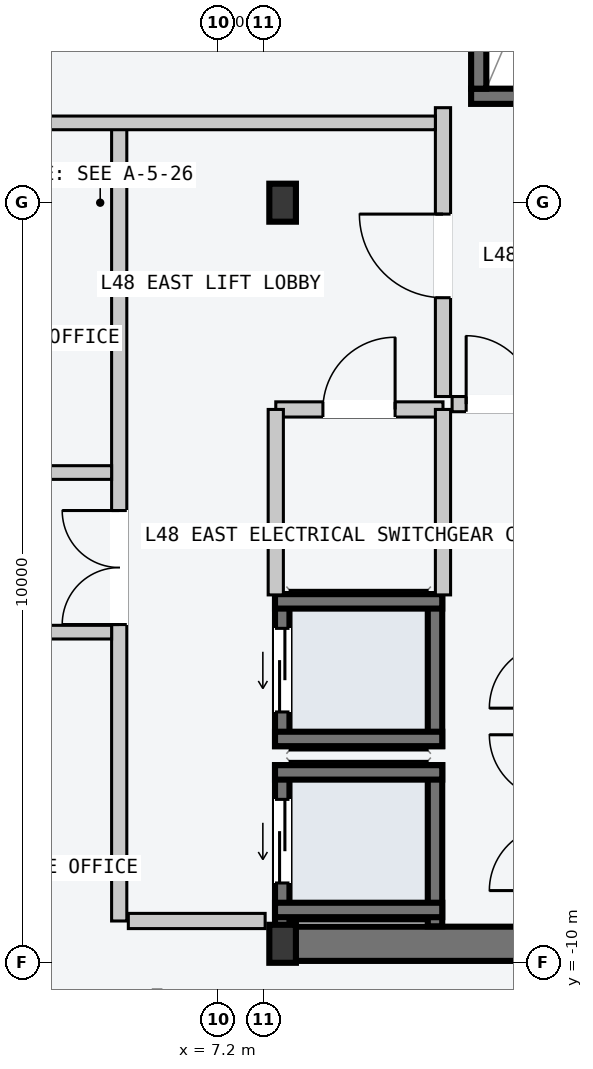
"""IFC4 building model, lengths in metres.
Left out: names, types, materials, properties, quantities, classifications, styles, units other than length and angle.
Written with IfcOpenShell. Run it as: python <this file> out.ifc"""

import sys

from ifc_helpers import new_model, si_unit, direction, frame, frame_2d, origin, origin_2d, place, context, subcontext, project, spatial, rectangle, i_section, extrude, element, fill, save


model = new_model("IFC4")
c1 = context("Model", 3, precision=1e-05, world=origin(), true_north=direction((0.0, 1.0)))
c2 = subcontext(c1, "Body", "Model", "MODEL_VIEW")
j1 = project(units=[si_unit("LENGTHUNIT", "METRE"), si_unit("PLANEANGLEUNIT", "RADIAN")], contexts=[c1])
p1 = place(None, origin())
s1 = spatial("IfcSite", under=j1, at=p1, CompositionType="ELEMENT")
p2 = place(p1, origin())
s2 = spatial("IfcBuilding", under=s1, at=p2, CompositionType="ELEMENT")
p3 = place(p2, frame((0.0, 0.0, 183.9)))
s3 = spatial("IfcBuildingStorey", under=s2, at=p3, CompositionType="ELEMENT", Elevation=183.9)
p4 = place(p3, frame((8.07, -9.75, -0.2), z_axis=(0.0, 0.0, 1.0), x_axis=(1.0, 0.0, 0.0)))
e1 = element("IfcWall", 1, at=p4, inside=s3, PredefinedType="SHEAR", context=c2, shape_type="SweptSolid", body=[
    extrude(rectangle(XDim=6.46, YDim=0.45, at=frame_2d((3.23, 0.0))), origin(), (0.0, 0.0, 1.0), 3.6),
])
p5 = place(p3, frame((10.53, 1.4, -0.2), z_axis=(0.0, 0.0, 1.0), x_axis=(1.0, 0.0, 0.0)))
e2 = element("IfcWall", 2, at=p5, inside=s3, PredefinedType="SOLIDWALL", context=c2, shape_type="SweptSolid", body=[
    extrude(rectangle(XDim=3.72, YDim=0.2, at=frame_2d((1.86, 0.0))), origin(), (0.0, 0.0, 1.0), 3.6),
])
p6 = place(p5, frame((1.5, 0.0, 0.2)))
e3 = element("IfcOpeningElement", 3, at=p6, cuts=e2, PredefinedType="OPENING", context=c2, shape_type="SweptSolid", body=[
    extrude(rectangle(XDim=1.12, YDim=2.18, at=frame_2d((0.56, 1.09))), frame((0.0, 0.11, 0.0), z_axis=(0.0, -1.0, 0.0), x_axis=(1.0, 0.0, 0.0)), (0.0, 0.0, 1.0), 0.22),
])
p7 = place(p3, frame((10.63, 1.5, -0.2), z_axis=(0.0, 0.0, 1.0), x_axis=(0.0, 1.0, 0.0)))
e4 = element("IfcWall", 4, at=p7, inside=s3, PredefinedType="SOLIDWALL", context=c2, shape_type="SweptSolid", body=[
    extrude(rectangle(XDim=7.8, YDim=0.2, at=frame_2d((3.9, 0.0))), origin(), (0.0, 0.0, 1.0), 3.6),
])
for number, where, z_axis, x_axis in (
    (5, (8.05, -9.75, 0.0), (0.0, 0.0, 1.0), (1.0, 0.0, 0.0)),
    (6, (8.05, 0.0, 0.0), (0.0, 0.0, 1.0), (1.0, 0.0, 0.0)),
):
    element("IfcColumn", number, at=place(p3, frame(where, z_axis=z_axis, x_axis=x_axis)), inside=s3, PredefinedType="COLUMN", context=c2, shape_type="SweptSolid", body=[
        extrude(i_section(OverallWidth=0.35, OverallDepth=0.5, WebThickness=0.02, FlangeThickness=0.032, at=origin_2d()), origin(), (0.0, 0.0, 1.0), 3.6),
    ])
p8 = place(p3, frame((8.045, -9.52, -0.2), z_axis=(0.0, 0.0, 1.0), x_axis=(0.0, 1.0, 0.0)))
e7 = element("IfcWall", 7, at=p8, inside=s3, PredefinedType="SOLIDWALL", context=c2, shape_type="SweptSolid", body=[
    extrude(rectangle(XDim=2.12, YDim=0.19, at=frame_2d((1.06, 0.0))), origin(), (0.0, 0.0, 1.0), 3.6),
])
p9 = place(p8, frame((0.57, 0.0, 0.2)))
e8 = element("IfcOpeningElement", 8, at=p9, cuts=e7, PredefinedType="OPENING", context=c2, shape_type="SweptSolid", body=[
    extrude(rectangle(XDim=1.1, YDim=2.2, at=frame_2d((0.55, 1.1))), frame((0.0, 0.105, 0.0), z_axis=(0.0, -1.0, 0.0), x_axis=(1.0, 0.0, 0.0)), (0.0, 0.0, 1.0), 0.21),
])
p10 = place(p3, frame((10.055, -9.52, -0.2), z_axis=(0.0, 0.0, 1.0), x_axis=(0.0, 1.0, 0.0)))
e9 = element("IfcWall", 9, at=p10, inside=s3, PredefinedType="SOLIDWALL", context=c2, shape_type="SweptSolid", body=[
    extrude(rectangle(XDim=2.12, YDim=0.19, at=frame_2d((1.06, 0.0))), origin(), (0.0, 0.0, 1.0), 3.6),
])
for number, where, z_axis, x_axis in (
    (10, (7.95, -7.495, -0.2), (0.0, 0.0, 1.0), (1.0, 0.0, 0.0)),
    (11, (7.95, -9.305, -0.2), (0.0, 0.0, 1.0), (1.0, 0.0, 0.0)),
):
    element("IfcWall", number, at=place(p3, frame(where, z_axis=z_axis, x_axis=x_axis)), inside=s3, PredefinedType="SOLIDWALL", context=c2, shape_type="SweptSolid", body=[
        extrude(rectangle(XDim=2.2, YDim=0.19, at=frame_2d((1.1, 0.0))), origin(), (0.0, 0.0, 1.0), 3.6),
    ])
p11 = place(p3, frame((8.045, -7.15, -0.2), z_axis=(0.0, 0.0, 1.0), x_axis=(0.0, 1.0, 0.0)))
e12 = element("IfcWall", 12, at=p11, inside=s3, PredefinedType="SOLIDWALL", context=c2, shape_type="SweptSolid", body=[
    extrude(rectangle(XDim=2.0, YDim=0.19, at=frame_2d((1.0, 0.0))), origin(), (0.0, 0.0, 1.0), 3.6),
])
p12 = place(p11, frame((0.45, 0.0, 0.2)))
e13 = element("IfcOpeningElement", 13, at=p12, cuts=e12, PredefinedType="OPENING", context=c2, shape_type="SweptSolid", body=[
    extrude(rectangle(XDim=1.1, YDim=2.2, at=frame_2d((0.55, 1.1))), frame((0.0, 0.105, 0.0), z_axis=(0.0, -1.0, 0.0), x_axis=(1.0, 0.0, 0.0)), (0.0, 0.0, 1.0), 0.21),
])
p13 = place(p3, frame((10.055, -7.15, -0.2), z_axis=(0.0, 0.0, 1.0), x_axis=(0.0, 1.0, 0.0)))
e14 = element("IfcWall", 14, at=p13, inside=s3, PredefinedType="SOLIDWALL", context=c2, shape_type="SweptSolid", body=[
    extrude(rectangle(XDim=2.0, YDim=0.19, at=frame_2d((1.0, 0.0))), origin(), (0.0, 0.0, 1.0), 3.6),
])
for number, where, z_axis, x_axis in (
    (15, (7.95, -5.245, -0.2), (0.0, 0.0, 1.0), (1.0, 0.0, 0.0)),
    (16, (7.95, -7.055, -0.2), (0.0, 0.0, 1.0), (1.0, 0.0, 0.0)),
):
    element("IfcWall", number, at=place(p3, frame(where, z_axis=z_axis, x_axis=x_axis)), inside=s3, PredefinedType="SOLIDWALL", context=c2, shape_type="SweptSolid", body=[
        extrude(rectangle(XDim=2.2, YDim=0.19, at=frame_2d((1.1, 0.0))), origin(), (0.0, 0.0, 1.0), 3.6),
    ])
p14 = place(p3, frame((5.9, -9.45, 0.0), z_axis=(0.0, 0.0, 1.0), x_axis=(0.0, 1.0, 0.0)))
e17 = element("IfcWall", 17, at=p14, inside=s3, PredefinedType="PARTITIONING", context=c2, shape_type="SweptSolid", body=[
    extrude(rectangle(XDim=10.5, YDim=0.2, at=frame_2d((5.25, 0.0))), origin(), (0.0, 0.0, 1.0), 3.4),
])
p15 = place(p14, frame((3.9, 0.0, 0.0)))
e18 = element("IfcOpeningElement", 18, at=p15, cuts=e17, PredefinedType="OPENING", context=c2, shape_type="SweptSolid", body=[
    extrude(rectangle(XDim=1.5, YDim=2.2, at=frame_2d((0.75, 1.1))), frame((0.0, 0.11, 0.0), z_axis=(0.0, -1.0, 0.0), x_axis=(1.0, 0.0, 0.0)), (0.0, 0.0, 1.0), 0.22),
])
p16 = place(p3, frame((6.02, -9.45, 0.0), z_axis=(0.0, 0.0, 1.0), x_axis=(1.0, 0.0, 0.0)))
e19 = element("IfcWall", 19, at=p16, inside=s3, PredefinedType="PARTITIONING", context=c2, shape_type="SweptSolid", body=[
    extrude(rectangle(XDim=1.8, YDim=0.2, at=frame_2d((0.9, 0.0))), origin(), (0.0, 0.0, 1.0), 3.4),
])
p17 = place(p3, frame((10.16, -2.55, 0.0), z_axis=(0.0, 0.0, 1.0), x_axis=(0.0, 1.0, 0.0)))
e20 = element("IfcWall", 20, at=p17, inside=s3, PredefinedType="PARTITIONING", context=c2, shape_type="SweptSolid", body=[
    extrude(rectangle(XDim=3.8, YDim=0.2, at=frame_2d((1.9, 0.0))), origin(), (0.0, 0.0, 1.0), 3.4),
])
p18 = place(p17, frame((1.3, 0.0, 0.0)))
e21 = element("IfcOpeningElement", 21, at=p18, cuts=e20, PredefinedType="OPENING", context=c2, shape_type="SweptSolid", body=[
    extrude(rectangle(XDim=1.1, YDim=2.15, at=frame_2d((0.55, 1.075))), frame((0.0, 0.11, 0.0), z_axis=(0.0, -1.0, 0.0), x_axis=(1.0, 0.0, 0.0)), (0.0, 0.0, 1.0), 0.22),
])
p19 = place(p3, frame((10.28, -2.65, 0.0), z_axis=(0.0, 0.0, 1.0), x_axis=(1.0, 0.0, 0.0)))
e22 = element("IfcWall", 22, at=p19, inside=s3, PredefinedType="PARTITIONING", context=c2, shape_type="SweptSolid", body=[
    extrude(rectangle(XDim=1.27, YDim=0.2, at=frame_2d((0.635, 0.0))), origin(), (0.0, 0.0, 1.0), 3.4),
])
p20 = place(p19, frame((0.185, 0.0, 0.0)))
e23 = element("IfcOpeningElement", 23, at=p20, cuts=e22, PredefinedType="OPENING", context=c2, shape_type="SweptSolid", body=[
    extrude(rectangle(XDim=0.9, YDim=2.15, at=frame_2d((0.45, 1.075))), frame((0.0, 0.11, 0.0), z_axis=(0.0, -1.0, 0.0), x_axis=(1.0, 0.0, 0.0)), (0.0, 0.0, 1.0), 0.22),
])
p21 = place(p3, frame((7.96, -2.72, 0.0), z_axis=(0.0, 0.0, 1.0), x_axis=(1.0, 0.0, 0.0)))
e24 = element("IfcWall", 24, at=p21, inside=s3, PredefinedType="PARTITIONING", context=c2, shape_type="SweptSolid", body=[
    extrude(rectangle(XDim=2.2, YDim=0.2, at=frame_2d((1.1, 0.0))), origin(), (0.0, 0.0, 1.0), 3.4),
])
p22 = place(p21, frame((0.62, 0.0, 0.0)))
e25 = element("IfcOpeningElement", 25, at=p22, cuts=e24, PredefinedType="OPENING", context=c2, shape_type="SweptSolid", body=[
    extrude(rectangle(XDim=0.95, YDim=2.1, at=frame_2d((0.475, 1.05))), frame((0.0, 0.11, 0.0), z_axis=(0.0, -1.0, 0.0), x_axis=(1.0, 0.0, 0.0)), (0.0, 0.0, 1.0), 0.22),
])
for number, where, z_axis, x_axis in (
    (26, (7.96, -5.16, 0.0), (0.0, 0.0, 1.0), (0.0, 1.0, 0.0)),
    (27, (10.16, -5.16, 0.0), (0.0, 0.0, 1.0), (0.0, 1.0, 0.0)),
):
    element("IfcWall", number, at=place(p3, frame(where, z_axis=z_axis, x_axis=x_axis)), inside=s3, PredefinedType="PARTITIONING", context=c2, shape_type="SweptSolid", body=[
        extrude(rectangle(XDim=2.44, YDim=0.2, at=frame_2d((1.22, 0.0))), origin(), (0.0, 0.0, 1.0), 3.4),
    ])
p23 = place(p3, frame((1.26, 1.05, 0.0), z_axis=(0.0, 0.0, 1.0), x_axis=(1.0, 0.0, 0.0)))
e28 = element("IfcWall", 28, at=p23, inside=s3, PredefinedType="PARTITIONING", context=c2, shape_type="SweptSolid", body=[
    extrude(rectangle(XDim=8.8, YDim=0.18, at=frame_2d((4.4, 0.0))), origin(), (0.0, 0.0, 1.0), 3.4),
])
for number, where, z_axis, x_axis in (
    (29, (1.26, -3.55, 0.0), (0.0, 0.0, 1.0), (1.0, 0.0, 0.0)),
    (30, (1.26, -5.65, 0.0), (0.0, 0.0, 1.0), (1.0, 0.0, 0.0)),
):
    element("IfcWall", number, at=place(p3, frame(where, z_axis=z_axis, x_axis=x_axis)), inside=s3, PredefinedType="PARTITIONING", context=c2, shape_type="SweptSolid", body=[
        extrude(rectangle(XDim=4.54, YDim=0.18, at=frame_2d((2.27, 0.0))), origin(), (0.0, 0.0, 1.0), 3.4),
    ])
p24 = place(p9, origin())
e31 = element("IfcDoor", 31, at=p24, inside=s3, OperationType="SLIDING_TO_LEFT", PredefinedType="DOOR", context=c2, shape_type="SweptSolid", body=[
    extrude(rectangle(XDim=1.1, YDim=2.2, at=frame_2d((0.55, 1.1))), frame((0.0, 0.025, 0.0), z_axis=(0.0, -1.0, 0.0), x_axis=(1.0, 0.0, 0.0)), (0.0, 0.0, 1.0), 0.05),
])
fill(e8, e31)
p25 = place(p12, origin())
e32 = element("IfcDoor", 32, at=p25, inside=s3, OperationType="SLIDING_TO_LEFT", PredefinedType="DOOR", context=c2, shape_type="SweptSolid", body=[
    extrude(rectangle(XDim=1.1, YDim=2.2, at=frame_2d((0.55, 1.1))), frame((0.0, 0.025, 0.0), z_axis=(0.0, -1.0, 0.0), x_axis=(1.0, 0.0, 0.0)), (0.0, 0.0, 1.0), 0.05),
])
fill(e13, e32)
p26 = place(p15, origin())
e33 = element("IfcDoor", 33, at=p26, inside=s3, OperationType="DOUBLE_DOOR_SINGLE_SWING", PredefinedType="DOOR", context=c2, shape_type="SweptSolid", body=[
    extrude(rectangle(XDim=1.5, YDim=2.2, at=frame_2d((0.75, 1.1))), frame((0.0, 0.025, 0.0), z_axis=(0.0, -1.0, 0.0), x_axis=(1.0, 0.0, 0.0)), (0.0, 0.0, 1.0), 0.05),
])
fill(e18, e33)
p27 = place(p18, origin())
e34 = element("IfcDoor", 34, at=p27, inside=s3, OperationType="SINGLE_SWING_RIGHT", PredefinedType="DOOR", context=c2, shape_type="SweptSolid", body=[
    extrude(rectangle(XDim=1.1, YDim=2.15, at=frame_2d((0.55, 1.075))), frame((0.0, 0.025, 0.0), z_axis=(0.0, -1.0, 0.0), x_axis=(1.0, 0.0, 0.0)), (0.0, 0.0, 1.0), 0.05),
])
fill(e21, e34)
p28 = place(p20, origin())
e35 = element("IfcDoor", 35, at=p28, inside=s3, OperationType="SINGLE_SWING_LEFT", PredefinedType="DOOR", context=c2, shape_type="SweptSolid", body=[
    extrude(rectangle(XDim=0.9, YDim=2.15, at=frame_2d((0.45, 1.075))), frame((0.0, 0.025, 0.0), z_axis=(0.0, -1.0, 0.0), x_axis=(1.0, 0.0, 0.0)), (0.0, 0.0, 1.0), 0.05),
])
fill(e23, e35)
p29 = place(p22, origin())
e36 = element("IfcDoor", 36, at=p29, inside=s3, OperationType="SINGLE_SWING_RIGHT", PredefinedType="DOOR", context=c2, shape_type="SweptSolid", body=[
    extrude(rectangle(XDim=0.95, YDim=2.1, at=frame_2d((0.475, 1.05))), frame((0.0, 0.025, 0.0), z_axis=(0.0, -1.0, 0.0), x_axis=(1.0, 0.0, 0.0)), (0.0, 0.0, 1.0), 0.05),
])
fill(e25, e36)
save(model, sys.argv[1])
